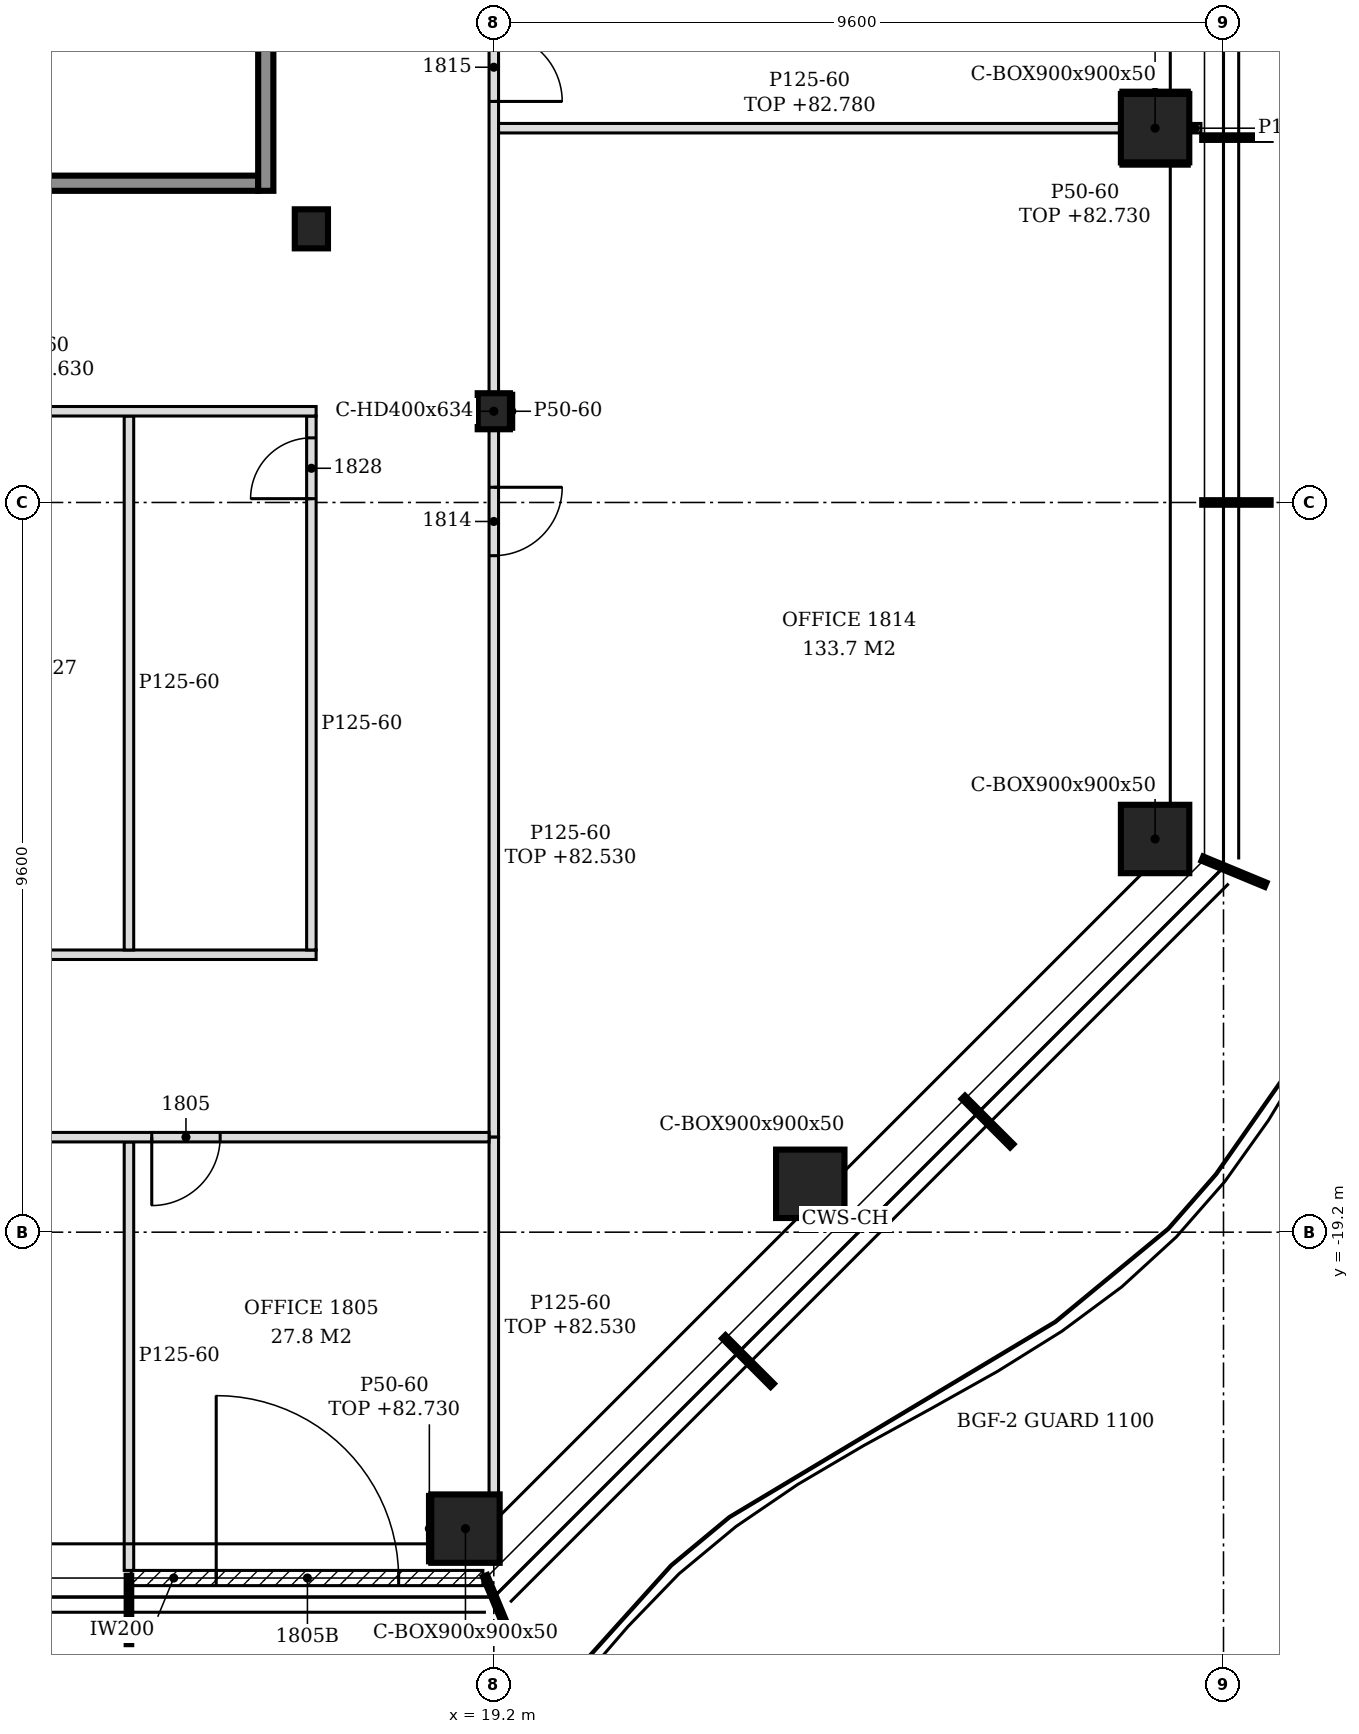
"""IFC4 building model, lengths in metres.
Left out: names, types, materials, properties, quantities, classifications, styles, units other than length and angle.
Written with IfcOpenShell. Run it as: python <this file> out.ifc"""

import sys

from ifc_helpers import new_model, si_unit, direction, frame, frame_2d, origin, origin_2d, place, context, subcontext, project, spatial, polyline, rectangle, hollow_rectangle, i_section, outline, extrude, element, fill, save


model = new_model("IFC4")
c1 = context("Model", 3, precision=1e-05, world=origin(), true_north=direction((0.0, 1.0)))
c2 = subcontext(c1, "Body", "Model", "MODEL_VIEW")
j1 = project(units=[si_unit("LENGTHUNIT", "METRE"), si_unit("PLANEANGLEUNIT", "RADIAN")], contexts=[c1])
p1 = place(None, origin())
s1 = spatial("IfcSite", under=j1, at=p1, CompositionType="ELEMENT")
p2 = place(p1, origin())
s2 = spatial("IfcBuilding", under=s1, at=p2, CompositionType="ELEMENT")
p3 = place(p2, frame((0.0, 0.0, 79.8)))
s3 = spatial("IfcBuildingStorey", under=s2, at=p3, CompositionType="ELEMENT", Elevation=79.8)
for number, where, z_axis, x_axis in (
    (1, (18.827, -23.1, -0.15), (0.0, 0.0, 1.0), (1.0, 0.0, 0.0)),
    (2, (23.364, -18.564, -0.15), (0.0, 0.0, 1.0), (1.0, 0.0, 0.0)),
    (3, (27.9, -14.027, -0.15), (0.0, 0.0, 1.0), (1.0, 0.0, 0.0)),
    (4, (27.9, -4.676, -0.15), (0.0, 0.0, 1.0), (1.0, 0.0, 0.0)),
):
    element("IfcColumn", number, at=place(p3, frame(where, z_axis=z_axis, x_axis=x_axis)), inside=s3, PredefinedType="COLUMN", context=c2, shape_type="SweptSolid", body=[
        extrude(hollow_rectangle(XDim=0.9, YDim=0.9, WallThickness=0.05, at=origin_2d()), origin(), (0.0, 0.0, 1.0), 3.6),
    ])
p4 = place(p3, frame((19.2, -8.4, -0.15), z_axis=(0.0, 0.0, 1.0), x_axis=(1.0, 0.0, 0.0)))
e5 = element("IfcColumn", 5, at=p4, inside=s3, PredefinedType="COLUMN", context=c2, shape_type="SweptSolid", body=[
    extrude(i_section(OverallWidth=0.424, OverallDepth=0.474, WebThickness=0.048, FlangeThickness=0.077, FilletRadius=0.015, at=origin_2d()), origin(), (0.0, 0.0, 1.0), 3.6),
])
p5 = place(p3, frame((16.8, -6.0, -0.15), z_axis=(0.0, 0.0, 1.0), x_axis=(1.0, 0.0, 0.0)))
e6 = element("IfcColumn", 6, at=p5, inside=s3, PredefinedType="COLUMN", context=c2, shape_type="SweptSolid", body=[
    extrude(i_section(OverallWidth=0.437, OverallDepth=0.514, WebThickness=0.061, FlangeThickness=0.097, FilletRadius=0.015, at=origin_2d()), origin(), (0.0, 0.0, 1.0), 3.6),
])
p6 = place(p3, frame((14.43, -23.75, 0.0), z_axis=(0.0, 0.0, 1.0), x_axis=(1.0, 0.0, 0.0)))
e7 = element("IfcWall", 7, at=p6, inside=s3, PredefinedType="NOTDEFINED", context=c2, shape_type="SweptSolid", body=[
    extrude(rectangle(XDim=4.626, YDim=0.2, at=frame_2d((2.313, 0.0))), origin(), (0.0, 0.0, 1.0), 3.45),
])
p7 = place(p6, frame((1.118, 0.0, 0.0)))
e8 = element("IfcOpeningElement", 8, at=p7, cuts=e7, PredefinedType="OPENING", context=c2, shape_type="SweptSolid", body=[
    extrude(rectangle(XDim=2.4, YDim=2.4, at=frame_2d((1.2, 1.2))), frame((0.0, 0.11, 0.0), z_axis=(0.0, -1.0, 0.0), x_axis=(1.0, 0.0, 0.0)), (0.0, 0.0, 1.0), 0.22),
])
p8 = place(p3, frame((12.7, -5.4, 0.0), z_axis=(0.0, 0.0, 1.0), x_axis=(1.0, 0.0, 0.0)))
e9 = element("IfcWall", 9, at=p8, inside=s3, PredefinedType="SOLIDWALL", context=c2, shape_type="SweptSolid", body=[
    extrude(rectangle(XDim=3.4, YDim=0.2, at=frame_2d((1.7, 0.0))), origin(), (0.0, 0.0, 1.0), 3.45),
])
p9 = place(p3, frame((16.2, -5.5, 0.0), z_axis=(0.0, 0.0, 1.0), x_axis=(0.0, 1.0, 0.0)))
e10 = element("IfcWall", 10, at=p9, inside=s3, PredefinedType="SOLIDWALL", context=c2, shape_type="SweptSolid", body=[
    extrude(rectangle(XDim=15.8, YDim=0.2, at=frame_2d((7.9, 0.0))), origin(), (0.0, 0.0, 1.0), 3.45),
])
p10 = place(p9, frame((3.05, 0.0, 0.0)))
e11 = element("IfcOpeningElement", 11, at=p10, cuts=e10, PredefinedType="OPENING", context=c2, shape_type="SweptSolid", body=[
    extrude(rectangle(XDim=1.3, YDim=2.1, at=frame_2d((0.65, 1.05))), frame((0.0, 0.11, 0.0), z_axis=(0.0, -1.0, 0.0), x_axis=(1.0, 0.0, 0.0)), (0.0, 0.0, 1.0), 0.22),
])
p11 = place(p9, frame((11.45, 0.0, 0.0)))
e12 = element("IfcOpeningElement", 12, at=p11, cuts=e10, PredefinedType="OPENING", context=c2, shape_type="SweptSolid", body=[
    extrude(rectangle(XDim=1.3, YDim=2.1, at=frame_2d((0.65, 1.05))), frame((0.0, 0.11, 0.0), z_axis=(0.0, -1.0, 0.0), x_axis=(1.0, 0.0, 0.0)), (0.0, 0.0, 1.0), 0.22),
])
p12 = place(p3, frame((14.4, -23.65, 0.0), z_axis=(0.0, 0.0, 1.0), x_axis=(0.0, 1.0, 0.0)))
e13 = element("IfcWall", 13, at=p12, inside=s3, PredefinedType="PARTITIONING", context=c2, shape_type="SweptSolid", body=[
    extrude(outline(polyline([(0.0, 0.0), (5.637, 0.0), (5.637, 3.45), (4.555, 3.45), (4.553, 2.88), (4.345, 2.88), (4.343, 3.45), (0.7, 3.45), (0.698, 2.93), (0.4, 2.93), (0.398, 3.45), (0.0, 3.45), (0.0, 0.0)])), frame((0.0, 0.062, 0.0), z_axis=(0.0, -1.0, 0.0), x_axis=(1.0, 0.0, 0.0)), (0.0, 0.0, 1.0), 0.125),
])
p13 = place(p3, frame((19.2, -22.65, 0.0), z_axis=(0.0, 0.0, 1.0), x_axis=(0.0, 1.0, 0.0)))
e14 = element("IfcWall", 14, at=p13, inside=s3, PredefinedType="PARTITIONING", context=c2, shape_type="SweptSolid", body=[
    extrude(outline(polyline([(0.0, 0.0), (4.7, 0.0), (4.7, 2.73), (0.48, 2.73), (0.478, 2.63), (0.0, 2.63), (0.0, 0.0)])), frame((0.0, 0.062, 0.0), z_axis=(0.0, -1.0, 0.0), x_axis=(1.0, 0.0, 0.0)), (0.0, 0.0, 1.0), 0.125),
])
p14 = place(p3, frame((-20.75, -17.95, 0.0), z_axis=(0.0, 0.0, 1.0), x_axis=(1.0, 0.0, 0.0)))
e15 = element("IfcWall", 15, at=p14, inside=s3, PredefinedType="PARTITIONING", context=c2, shape_type="SweptSolid", body=[
    extrude(outline(polyline([(0.0, 0.0), (39.887, 0.0), (39.887, 2.73), (39.8, 2.73), (39.798, 3.45), (28.1, 3.45), (28.098, 2.73), (27.8, 2.73), (27.798, 3.45), (16.1, 3.45), (16.098, 2.73), (15.8, 2.73), (15.798, 3.45), (6.5, 3.45), (6.498, 2.93), (6.2, 2.93), (6.198, 3.45), (0.0, 3.45), (0.0, 0.0)])), frame((0.0, 0.062, 0.0), z_axis=(0.0, -1.0, 0.0), x_axis=(1.0, 0.0, 0.0)), (0.0, 0.0, 1.0), 0.125),
])
p15 = place(p14, frame((5.15, 0.0, 0.0)))
e16 = element("IfcOpeningElement", 16, at=p15, cuts=e15, PredefinedType="OPENING", context=c2, shape_type="SweptSolid", body=[
    extrude(rectangle(XDim=0.9, YDim=2.1, at=frame_2d((0.45, 1.05))), frame((0.0, 0.073, 0.0), z_axis=(0.0, -1.0, 0.0), x_axis=(1.0, 0.0, 0.0)), (0.0, 0.0, 1.0), 0.145),
])
p16 = place(p14, frame((14.75, 0.0, 0.0)))
e17 = element("IfcOpeningElement", 17, at=p16, cuts=e15, PredefinedType="OPENING", context=c2, shape_type="SweptSolid", body=[
    extrude(rectangle(XDim=0.9, YDim=2.1, at=frame_2d((0.45, 1.05))), frame((0.0, 0.073, 0.0), z_axis=(0.0, -1.0, 0.0), x_axis=(1.0, 0.0, 0.0)), (0.0, 0.0, 1.0), 0.145),
])
p17 = place(p14, frame((24.35, 0.0, 0.0)))
e18 = element("IfcOpeningElement", 18, at=p17, cuts=e15, PredefinedType="OPENING", context=c2, shape_type="SweptSolid", body=[
    extrude(rectangle(XDim=0.9, YDim=2.1, at=frame_2d((0.45, 1.05))), frame((0.0, 0.073, 0.0), z_axis=(0.0, -1.0, 0.0), x_axis=(1.0, 0.0, 0.0)), (0.0, 0.0, 1.0), 0.145),
])
p18 = place(p14, frame((29.75, 0.0, 0.0)))
e19 = element("IfcOpeningElement", 19, at=p18, cuts=e15, PredefinedType="OPENING", context=c2, shape_type="SweptSolid", body=[
    extrude(rectangle(XDim=0.9, YDim=2.1, at=frame_2d((0.45, 1.05))), frame((0.0, 0.073, 0.0), z_axis=(0.0, -1.0, 0.0), x_axis=(1.0, 0.0, 0.0)), (0.0, 0.0, 1.0), 0.145),
])
p19 = place(p14, frame((35.45, 0.0, 0.0)))
e20 = element("IfcOpeningElement", 20, at=p19, cuts=e15, PredefinedType="OPENING", context=c2, shape_type="SweptSolid", body=[
    extrude(rectangle(XDim=0.9, YDim=2.1, at=frame_2d((0.45, 1.05))), frame((0.0, 0.073, 0.0), z_axis=(0.0, -1.0, 0.0), x_axis=(1.0, 0.0, 0.0)), (0.0, 0.0, 1.0), 0.145),
])
p20 = place(p3, frame((19.2, -17.95, 0.0), z_axis=(0.0, 0.0, 1.0), x_axis=(0.0, 1.0, 0.0)))
e21 = element("IfcWall", 21, at=p20, inside=s3, PredefinedType="PARTITIONING", context=c2, shape_type="SweptSolid", body=[
    extrude(rectangle(XDim=9.313, YDim=0.125, at=frame_2d((4.656, 0.0))), origin(), (0.0, 0.0, 1.0), 2.73),
])
p21 = place(p20, frame((7.65, 0.0, 0.0)))
e22 = element("IfcOpeningElement", 22, at=p21, cuts=e21, PredefinedType="OPENING", context=c2, shape_type="SweptSolid", body=[
    extrude(rectangle(XDim=0.9, YDim=2.1, at=frame_2d((0.45, 1.05))), frame((0.0, 0.073, 0.0), z_axis=(0.0, -1.0, 0.0), x_axis=(1.0, 0.0, 0.0)), (0.0, 0.0, 1.0), 0.145),
])
p22 = place(p3, frame((2.337, -15.55, 0.0), z_axis=(0.0, 0.0, 1.0), x_axis=(1.0, 0.0, 0.0)))
e23 = element("IfcWall", 23, at=p22, inside=s3, PredefinedType="PARTITIONING", context=c2, shape_type="SweptSolid", body=[
    extrude(outline(polyline([(0.0, 0.0), (14.525, 0.0), (14.525, 3.45), (5.012, 3.45), (5.01, 2.73), (4.712, 2.73), (4.71, 3.45), (0.0, 3.45), (0.0, 0.0)])), frame((0.0, 0.062, 0.0), z_axis=(0.0, -1.0, 0.0), x_axis=(1.0, 0.0, 0.0)), (0.0, 0.0, 1.0), 0.125),
])
p23 = place(p3, frame((14.4, -15.488, 0.0), z_axis=(0.0, 0.0, 1.0), x_axis=(0.0, 1.0, 0.0)))
e24 = element("IfcWall", 24, at=p23, inside=s3, PredefinedType="PARTITIONING", context=c2, shape_type="SweptSolid", body=[
    extrude(outline(polyline([(0.0, 0.0), (7.025, 0.0), (7.025, 2.83), (6.938, 2.83), (6.936, 3.45), (1.192, 3.45), (1.19, 2.88), (0.982, 2.88), (0.98, 3.45), (0.0, 3.45), (0.0, 0.0)])), frame((0.0, 0.062, 0.0), z_axis=(0.0, -1.0, 0.0), x_axis=(1.0, 0.0, 0.0)), (0.0, 0.0, 1.0), 0.125),
])
p24 = place(p3, frame((16.8, -15.488, 0.0), z_axis=(0.0, 0.0, 1.0), x_axis=(0.0, 1.0, 0.0)))
e25 = element("IfcWall", 25, at=p24, inside=s3, PredefinedType="PARTITIONING", context=c2, shape_type="SweptSolid", body=[
    extrude(outline(polyline([(0.0, 0.0), (7.025, 0.0), (7.025, 2.83), (6.938, 2.83), (6.936, 3.45), (1.192, 3.45), (1.19, 2.88), (0.982, 2.88), (0.98, 3.45), (0.0, 3.45), (0.0, 0.0)])), frame((0.0, 0.062, 0.0), z_axis=(0.0, -1.0, 0.0), x_axis=(1.0, 0.0, 0.0)), (0.0, 0.0, 1.0), 0.125),
])
p25 = place(p24, frame((5.938, 0.0, 0.0)))
e26 = element("IfcOpeningElement", 26, at=p25, cuts=e25, PredefinedType="OPENING", context=c2, shape_type="SweptSolid", body=[
    extrude(rectangle(XDim=0.8, YDim=2.1, at=frame_2d((0.4, 1.05))), frame((0.0, 0.073, 0.0), z_axis=(0.0, -1.0, 0.0), x_axis=(1.0, 0.0, 0.0)), (0.0, 0.0, 1.0), 0.145),
])
p26 = place(p3, frame((7.412, -8.4, 0.0), z_axis=(0.0, 0.0, 1.0), x_axis=(1.0, 0.0, 0.0)))
e27 = element("IfcWall", 27, at=p26, inside=s3, PredefinedType="PARTITIONING", context=c2, shape_type="SweptSolid", body=[
    extrude(rectangle(XDim=9.45, YDim=0.125, at=frame_2d((4.725, 0.0))), origin(), (0.0, 0.0, 1.0), 2.83),
])
p27 = place(p26, frame((1.088, 0.0, 0.0)))
e28 = element("IfcOpeningElement", 28, at=p27, cuts=e27, PredefinedType="OPENING", context=c2, shape_type="SweptSolid", body=[
    extrude(rectangle(XDim=0.8, YDim=2.1, at=frame_2d((0.4, 1.05))), frame((0.0, 0.073, 0.0), z_axis=(0.0, -1.0, 0.0), x_axis=(1.0, 0.0, 0.0)), (0.0, 0.0, 1.0), 0.145),
])
p28 = place(p26, frame((2.488, 0.0, 0.0)))
e29 = element("IfcOpeningElement", 29, at=p28, cuts=e27, PredefinedType="OPENING", context=c2, shape_type="SweptSolid", body=[
    extrude(rectangle(XDim=0.8, YDim=2.1, at=frame_2d((0.4, 1.05))), frame((0.0, 0.073, 0.0), z_axis=(0.0, -1.0, 0.0), x_axis=(1.0, 0.0, 0.0)), (0.0, 0.0, 1.0), 0.145),
])
p29 = place(p3, frame((19.2, -8.163, 0.0), z_axis=(0.0, 0.0, 1.0), x_axis=(0.0, 1.0, 0.0)))
e30 = element("IfcWall", 30, at=p29, inside=s3, PredefinedType="PARTITIONING", context=c2, shape_type="SweptSolid", body=[
    extrude(rectangle(XDim=10.326, YDim=0.125, at=frame_2d((5.163, 0.0))), origin(), (0.0, 0.0, 1.0), 2.83),
])
p30 = place(p29, frame((3.839, 0.0, 0.0)))
e31 = element("IfcOpeningElement", 31, at=p30, cuts=e30, PredefinedType="OPENING", context=c2, shape_type="SweptSolid", body=[
    extrude(rectangle(XDim=0.9, YDim=2.1, at=frame_2d((0.45, 1.05))), frame((0.0, 0.073, 0.0), z_axis=(0.0, -1.0, 0.0), x_axis=(1.0, 0.0, 0.0)), (0.0, 0.0, 1.0), 0.145),
])
p31 = place(p3, frame((19.262, -4.676, 0.0), z_axis=(0.0, 0.0, 1.0), x_axis=(1.0, 0.0, 0.0)))
e32 = element("IfcWall", 32, at=p31, inside=s3, PredefinedType="PARTITIONING", context=c2, shape_type="SweptSolid", body=[
    extrude(outline(polyline([(0.0, 0.0), (8.188, 0.0), (8.188, 2.98), (0.087, 2.98), (0.085, 2.83), (0.0, 2.83), (0.0, 0.0)])), frame((0.0, 0.062, 0.0), z_axis=(0.0, -1.0, 0.0), x_axis=(1.0, 0.0, 0.0)), (0.0, 0.0, 1.0), 0.125),
])
p32 = place(p3, frame((28.35, -4.676, 0.0), z_axis=(0.0, 0.0, 1.0), x_axis=(1.0, 0.0, 0.0)))
e33 = element("IfcWall", 33, at=p32, inside=s3, PredefinedType="PARTITIONING", context=c2, shape_type="SweptSolid", body=[
    extrude(rectangle(XDim=0.153, YDim=0.125, at=frame_2d((0.076, 0.0))), origin(), (0.0, 0.0, 1.0), 3.45),
])
p33 = place(p3, frame((18.352, -23.55, 0.0), z_axis=(0.0, 0.0, 1.0), x_axis=(0.0, 1.0, 0.0)))
e34 = element("IfcWall", 34, at=p33, inside=s3, PredefinedType="PARTITIONING", context=c2, shape_type="SweptSolid", body=[
    extrude(rectangle(XDim=0.9, YDim=0.05, at=frame_2d((0.45, 0.0))), origin(), (0.0, 0.0, 1.0), 2.93),
])
p34 = place(p3, frame((19.437, -8.637, 0.0), z_axis=(0.0, 0.0, 1.0), x_axis=(0.0, 1.0, 0.0)))
e35 = element("IfcWall", 35, at=p34, inside=s3, PredefinedType="PARTITIONING", context=c2, shape_type="SweptSolid", body=[
    extrude(rectangle(XDim=0.474, YDim=0.05, at=frame_2d((0.237, 0.0))), origin(), (0.0, 0.0, 1.0), 3.45),
])
for number, where, z_axis, x_axis in (
    (36, (27.45, -4.201, 0.0), (0.0, 0.0, 1.0), (1.0, 0.0, 0.0)),
    (37, (27.45, -5.151, 0.0), (0.0, 0.0, 1.0), (1.0, 0.0, 0.0)),
):
    element("IfcWall", number, at=place(p3, frame(where, z_axis=z_axis, x_axis=x_axis)), inside=s3, PredefinedType="PARTITIONING", context=c2, shape_type="SweptSolid", body=[
        extrude(rectangle(XDim=0.9, YDim=0.05, at=frame_2d((0.45, 0.0))), origin(), (0.0, 0.0, 1.0), 2.93),
    ])
p35 = place(p7, origin())
e38 = element("IfcDoor", 38, at=p35, inside=s3, OperationType="SINGLE_SWING_LEFT", PredefinedType="DOOR", context=c2, shape_type="SweptSolid", body=[
    extrude(rectangle(XDim=2.4, YDim=2.4, at=frame_2d((1.2, 1.2))), frame((0.0, 0.025, 0.0), z_axis=(0.0, -1.0, 0.0), x_axis=(1.0, 0.0, 0.0)), (0.0, 0.0, 1.0), 0.05),
])
fill(e8, e38)
p36 = place(p19, frame((0.9, 0.0, 0.0), z_axis=(0.0, 0.0, 1.0), x_axis=(-1.0, 0.0, 0.0)))
e39 = element("IfcDoor", 39, at=p36, inside=s3, OperationType="SINGLE_SWING_RIGHT", PredefinedType="DOOR", context=c2, shape_type="SweptSolid", body=[
    extrude(rectangle(XDim=0.9, YDim=2.1, at=frame_2d((0.45, 1.05))), frame((0.0, 0.025, 0.0), z_axis=(0.0, -1.0, 0.0), x_axis=(1.0, 0.0, 0.0)), (0.0, 0.0, 1.0), 0.05),
])
fill(e20, e39)
p37 = place(p21, frame((0.9, 0.0, 0.0), z_axis=(0.0, 0.0, 1.0), x_axis=(-1.0, 0.0, 0.0)))
e40 = element("IfcDoor", 40, at=p37, inside=s3, OperationType="SINGLE_SWING_LEFT", PredefinedType="DOOR", context=c2, shape_type="SweptSolid", body=[
    extrude(rectangle(XDim=0.9, YDim=2.1, at=frame_2d((0.45, 1.05))), frame((0.0, 0.025, 0.0), z_axis=(0.0, -1.0, 0.0), x_axis=(1.0, 0.0, 0.0)), (0.0, 0.0, 1.0), 0.05),
])
fill(e22, e40)
p38 = place(p30, frame((0.9, 0.0, 0.0), z_axis=(0.0, 0.0, 1.0), x_axis=(-1.0, 0.0, 0.0)))
e41 = element("IfcDoor", 41, at=p38, inside=s3, OperationType="SINGLE_SWING_RIGHT", PredefinedType="DOOR", context=c2, shape_type="SweptSolid", body=[
    extrude(rectangle(XDim=0.9, YDim=2.1, at=frame_2d((0.45, 1.05))), frame((0.0, 0.025, 0.0), z_axis=(0.0, -1.0, 0.0), x_axis=(1.0, 0.0, 0.0)), (0.0, 0.0, 1.0), 0.05),
])
fill(e31, e41)
p39 = place(p25, origin())
e42 = element("IfcDoor", 42, at=p39, inside=s3, OperationType="SINGLE_SWING_LEFT", PredefinedType="DOOR", context=c2, shape_type="SweptSolid", body=[
    extrude(rectangle(XDim=0.8, YDim=2.1, at=frame_2d((0.4, 1.05))), frame((0.0, 0.025, 0.0), z_axis=(0.0, -1.0, 0.0), x_axis=(1.0, 0.0, 0.0)), (0.0, 0.0, 1.0), 0.05),
])
fill(e26, e42)
save(model, sys.argv[1])
